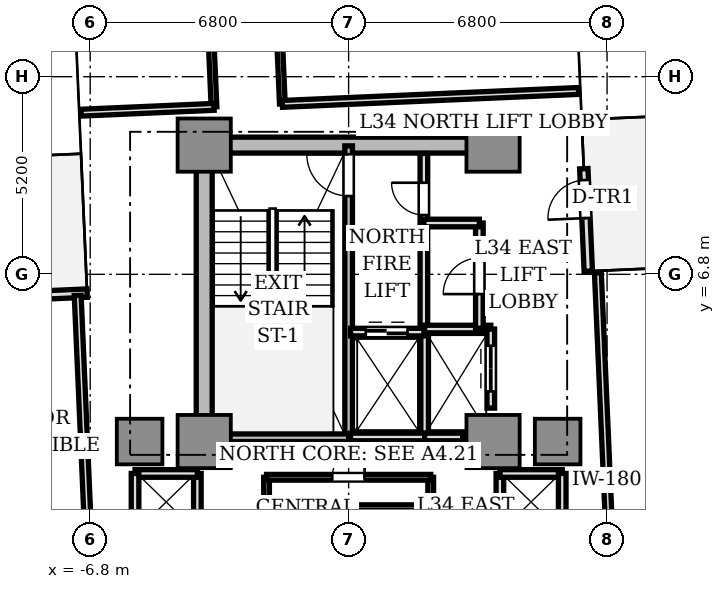
"""IFC4 building model, lengths in metres.
Left out: names, types, materials, properties, quantities, classifications, styles, units other than length and angle.
Written with IfcOpenShell. Run it as: python <this file> out.ifc"""

import sys

from ifc_helpers import new_model, si_unit, direction, frame, frame_2d, origin, origin_2d, place, context, subcontext, project, spatial, rectangle, extrude, source, transform, mapped, element, fill, save


model = new_model("IFC4")
c1 = context("Model", 3, precision=1e-05, world=origin(), true_north=direction((0.0, 1.0)))
c2 = subcontext(c1, "Body", "Model", "MODEL_VIEW")
j1 = project(units=[si_unit("LENGTHUNIT", "METRE"), si_unit("PLANEANGLEUNIT", "RADIAN")], contexts=[c1])
p1 = place(None, origin())
s1 = spatial("IfcSite", under=j1, at=p1, CompositionType="ELEMENT")
p2 = place(p1, origin())
s2 = spatial("IfcBuilding", under=s1, at=p2, CompositionType="ELEMENT")
p3 = place(p2, frame((0.0, 0.0, 124.85)))
s3 = spatial("IfcBuildingStorey", under=s2, at=p3, CompositionType="ELEMENT", Elevation=124.85)
p4 = place(p3, frame((-3.55, 10.2, 0.0), z_axis=(0.0, 0.0, 1.0), x_axis=(1.0, 0.0, 0.0)))
e1 = element("IfcWall", 1, at=p4, inside=s3, PredefinedType="SHEAR", context=c2, shape_type="SweptSolid", body=[
    extrude(rectangle(XDim=7.1, YDim=0.42, at=frame_2d((3.55, 0.0))), origin(), (0.0, 0.0, 1.0), 3.11),
])
p5 = place(p3, frame((-3.8, 2.85, 0.0), z_axis=(0.0, 0.0, 1.0), x_axis=(0.0, 1.0, 0.0)))
e2 = element("IfcWall", 2, at=p5, inside=s3, PredefinedType="SHEAR", context=c2, shape_type="SweptSolid", body=[
    extrude(rectangle(XDim=6.9, YDim=0.42, at=frame_2d((3.45, 0.0))), origin(), (0.0, 0.0, 1.0), 3.11),
])
m1 = source(origin(), c2, "Body", "SweptSolid", [
    extrude(rectangle(XDim=1.4, YDim=1.4, at=origin_2d()), origin(), (0.0, 0.0, 1.0), 3.11),
])
for number, where, z_axis, x_axis in (
    (3, (-3.8, 2.4, 0.0), (0.0, 0.0, 1.0), (1.0, 0.0, 0.0)),
    (4, (3.8, 2.4, 0.0), (0.0, 0.0, 1.0), (1.0, 0.0, 0.0)),
    (5, (-3.8, 10.2, 0.0), (0.0, 0.0, 1.0), (1.0, 0.0, 0.0)),
    (6, (3.8, 10.2, 0.0), (0.0, 0.0, 1.0), (1.0, 0.0, 0.0)),
):
    element("IfcColumn", number, at=place(p3, frame(where, z_axis=z_axis, x_axis=x_axis)), inside=s3, PredefinedType="COLUMN", context=c2, shape_type="MappedRepresentation", body=[
        mapped(m1, transform((0.0, 0.0, 0.0), scale=1.0)),
    ])
m2 = source(origin(), c2, "Body", "SweptSolid", [
    extrude(rectangle(XDim=1.2, YDim=1.2, at=origin_2d()), origin(), (0.0, 0.0, 1.0), 3.11),
])
for number, where, z_axis, x_axis in (
    (7, (5.5, 2.4, 0.0), (0.0, 0.0, 1.0), (1.0, 0.0, 0.0)),
    (8, (-5.5, 2.4, 0.0), (0.0, 0.0, 1.0), (1.0, 0.0, 0.0)),
):
    element("IfcColumn", number, at=place(p3, frame(where, z_axis=z_axis, x_axis=x_axis)), inside=s3, PredefinedType="COLUMN", context=c2, shape_type="MappedRepresentation", body=[
        mapped(m2, transform((0.0, 0.0, 0.0), scale=1.0)),
    ])
p6 = place(p3, frame((6.306, 6.882, 0.0), z_axis=(0.0, 0.0, 1.0), x_axis=(-0.043672655174, 0.999045894436, 0.0)))
e9 = element("IfcWall", 9, at=p6, inside=s3, PredefinedType="STANDARD", context=c2, shape_type="SweptSolid", body=[
    extrude(rectangle(XDim=2.7, YDim=0.22, at=frame_2d((1.35, 0.0))), origin(), (0.0, 0.0, 1.0), 3.11),
])
p7 = place(p6, frame((1.4, 0.0, 0.0)))
e10 = element("IfcOpeningElement", 10, at=p7, cuts=e9, PredefinedType="OPENING", context=c2, shape_type="SweptSolid", body=[
    extrude(rectangle(XDim=1.0, YDim=2.2, at=frame_2d((0.5, 1.1))), frame((0.0, 0.12, 0.0), z_axis=(0.0, -1.0, 0.0), x_axis=(1.0, 0.0, 0.0)), (0.0, 0.0, 1.0), 0.24),
])
p8 = place(p3, frame((-6.882, 6.306, 0.0), z_axis=(0.0, 0.0, 1.0), x_axis=(-0.999045894436, -0.043672655174, 0.0)))
e11 = element("IfcWall", 11, at=p8, inside=s3, PredefinedType="STANDARD", context=c2, shape_type="SweptSolid", body=[
    extrude(rectangle(XDim=2.7, YDim=0.22, at=frame_2d((1.35, 0.0))), origin(), (0.0, 0.0, 1.0), 3.11),
])
p9 = place(p8, frame((1.4, 0.0, 0.0)))
e12 = element("IfcOpeningElement", 12, at=p9, cuts=e11, PredefinedType="OPENING", context=c2, shape_type="SweptSolid", body=[
    extrude(rectangle(XDim=1.0, YDim=2.2, at=frame_2d((0.5, 1.1))), frame((0.0, 0.12, 0.0), z_axis=(0.0, -1.0, 0.0), x_axis=(1.0, 0.0, 0.0)), (0.0, 0.0, 1.0), 0.24),
])
p10 = place(p3, frame((0.0, 2.5, 0.0), z_axis=(0.0, 0.0, 1.0), x_axis=(0.0, 1.0, 0.0)))
e13 = element("IfcWall", 13, at=p10, inside=s3, PredefinedType="SOLIDWALL", context=c2, shape_type="SweptSolid", body=[
    extrude(rectangle(XDim=7.68, YDim=0.2, at=frame_2d((3.84, 0.0))), origin(), (0.0, 0.0, 1.0), 3.11),
])
p11 = place(p10, frame((6.36, 0.0, 0.0)))
e14 = element("IfcOpeningElement", 14, at=p11, cuts=e13, PredefinedType="OPENING", context=c2, shape_type="SweptSolid", body=[
    extrude(rectangle(XDim=1.1, YDim=2.15, at=frame_2d((0.55, 1.075))), frame((0.0, 0.11, 0.0), z_axis=(0.0, -1.0, 0.0), x_axis=(1.0, 0.0, 0.0)), (0.0, 0.0, 1.0), 0.22),
])
p12 = place(p3, frame((-3.72, 2.5, 0.0), z_axis=(0.0, 0.0, 1.0), x_axis=(1.0, 0.0, 0.0)))
e15 = element("IfcWall", 15, at=p12, inside=s3, PredefinedType="SOLIDWALL", context=c2, shape_type="SweptSolid", body=[
    extrude(rectangle(XDim=3.72, YDim=0.2, at=frame_2d((1.86, 0.0))), origin(), (0.0, 0.0, 1.0), 3.11),
])
p13 = place(p3, frame((1.98, 5.32, 0.0), z_axis=(0.0, 0.0, 1.0), x_axis=(0.0, 1.0, 0.0)))
e16 = element("IfcWall", 16, at=p13, inside=s3, PredefinedType="SOLIDWALL", context=c2, shape_type="SweptSolid", body=[
    extrude(rectangle(XDim=4.66, YDim=0.2, at=frame_2d((2.33, 0.0))), origin(), (0.0, 0.0, 1.0), 2.66),
])
p14 = place(p13, frame((3.04, 0.0, 0.0)))
e17 = element("IfcOpeningElement", 17, at=p14, cuts=e16, PredefinedType="OPENING", context=c2, shape_type="SweptSolid", body=[
    extrude(rectangle(XDim=0.85, YDim=2.1, at=frame_2d((0.425, 1.05))), frame((0.0, 0.11, 0.0), z_axis=(0.0, -1.0, 0.0), x_axis=(1.0, 0.0, 0.0)), (0.0, 0.0, 1.0), 0.22),
])
p15 = place(p3, frame((2.0, 2.5, 0.0), z_axis=(0.0, 0.0, 1.0), x_axis=(0.0, 1.0, 0.0)))
e18 = element("IfcWall", 18, at=p15, inside=s3, PredefinedType="SOLIDWALL", context=c2, shape_type="SweptSolid", body=[
    extrude(rectangle(XDim=2.78, YDim=0.2, at=frame_2d((1.39, 0.0))), origin(), (0.0, 0.0, 1.0), 2.66),
])
p16 = place(p3, frame((0.05, 2.52, 0.0), z_axis=(0.0, 0.0, 1.0), x_axis=(1.0, 0.0, 0.0)))
e19 = element("IfcWall", 19, at=p16, inside=s3, PredefinedType="SOLIDWALL", context=c2, shape_type="SweptSolid", body=[
    extrude(rectangle(XDim=1.95, YDim=0.2, at=frame_2d((0.975, 0.0))), origin(), (0.0, 0.0, 1.0), 2.66),
])
p17 = place(p3, frame((0.05, 5.28, 0.0), z_axis=(0.0, 0.0, 1.0), x_axis=(1.0, 0.0, 0.0)))
e20 = element("IfcWall", 20, at=p17, inside=s3, PredefinedType="SOLIDWALL", context=c2, shape_type="SweptSolid", body=[
    extrude(rectangle(XDim=1.93, YDim=0.2, at=frame_2d((0.965, 0.0))), origin(), (0.0, 0.0, 1.0), 2.66),
])
p18 = place(p17, frame((0.4, 0.0, 0.0)))
e21 = element("IfcOpeningElement", 21, at=p18, cuts=e20, PredefinedType="OPENING", context=c2, shape_type="SweptSolid", body=[
    extrude(rectangle(XDim=1.1, YDim=2.2, at=frame_2d((0.55, 1.1))), frame((0.0, 0.11, 0.0), z_axis=(0.0, -1.0, 0.0), x_axis=(1.0, 0.0, 0.0)), (0.0, 0.0, 1.0), 0.22),
])
p19 = place(p3, frame((2.0, 2.52, 0.0), z_axis=(0.0, 0.0, 1.0), x_axis=(1.0, 0.0, 0.0)))
e22 = element("IfcWall", 22, at=p19, inside=s3, PredefinedType="SOLIDWALL", context=c2, shape_type="SweptSolid", body=[
    extrude(rectangle(XDim=1.0, YDim=0.2, at=frame_2d((0.5, 0.0))), origin(), (0.0, 0.0, 1.0), 2.66),
])
p20 = place(p3, frame((2.0, 5.36, 0.0), z_axis=(0.0, 0.0, 1.0), x_axis=(1.0, 0.0, 0.0)))
e23 = element("IfcWall", 23, at=p20, inside=s3, PredefinedType="SOLIDWALL", context=c2, shape_type="SweptSolid", body=[
    extrude(rectangle(XDim=1.74, YDim=0.2, at=frame_2d((0.87, 0.0))), origin(), (0.0, 0.0, 1.0), 2.66),
])
p21 = place(p3, frame((3.74, 3.28, 0.0), z_axis=(0.0, 0.0, 1.0), x_axis=(0.0, 1.0, 0.0)))
e24 = element("IfcWall", 24, at=p21, inside=s3, PredefinedType="SOLIDWALL", context=c2, shape_type="SweptSolid", body=[
    extrude(rectangle(XDim=2.08, YDim=0.2, at=frame_2d((1.04, 0.0))), origin(), (0.0, 0.0, 1.0), 2.66),
])
p22 = place(p21, frame((0.44, 0.0, 0.0)))
e25 = element("IfcOpeningElement", 25, at=p22, cuts=e24, PredefinedType="OPENING", context=c2, shape_type="SweptSolid", body=[
    extrude(rectangle(XDim=1.2, YDim=2.2, at=frame_2d((0.6, 1.1))), frame((0.0, 0.11, 0.0), z_axis=(0.0, -1.0, 0.0), x_axis=(1.0, 0.0, 0.0)), (0.0, 0.0, 1.0), 0.22),
])
p23 = place(p3, frame((3.98, -1.56, 0.0), z_axis=(0.0, 0.0, 1.0), x_axis=(0.0, 1.0, 0.0)))
e26 = element("IfcWall", 26, at=p23, inside=s3, PredefinedType="SOLIDWALL", context=c2, shape_type="SweptSolid", body=[
    extrude(rectangle(XDim=3.12, YDim=0.2, at=frame_2d((1.56, 0.0))), origin(), (0.0, 0.0, 1.0), 2.28),
])
p24 = place(p3, frame((3.98, 1.56, 0.0), z_axis=(0.0, 0.0, 1.0), x_axis=(1.0, 0.0, 0.0)))
e27 = element("IfcWall", 27, at=p24, inside=s3, PredefinedType="SOLIDWALL", context=c2, shape_type="SweptSolid", body=[
    extrude(rectangle(XDim=1.64, YDim=0.2, at=frame_2d((0.82, 0.0))), origin(), (0.0, 0.0, 1.0), 2.66),
])
p25 = place(p3, frame((5.62, 0.0, 0.0), z_axis=(0.0, 0.0, 1.0), x_axis=(0.0, 1.0, 0.0)))
e28 = element("IfcWall", 28, at=p25, inside=s3, PredefinedType="SOLIDWALL", context=c2, shape_type="SweptSolid", body=[
    extrude(rectangle(XDim=1.56, YDim=0.2, at=frame_2d((0.78, 0.0))), origin(), (0.0, 0.0, 1.0), 2.66),
])
p26 = place(p3, frame((-3.98, -1.56, 0.0), z_axis=(0.0, 0.0, 1.0), x_axis=(0.0, 1.0, 0.0)))
e29 = element("IfcWall", 29, at=p26, inside=s3, PredefinedType="SOLIDWALL", context=c2, shape_type="SweptSolid", body=[
    extrude(rectangle(XDim=3.12, YDim=0.2, at=frame_2d((1.56, 0.0))), origin(), (0.0, 0.0, 1.0), 2.28),
])
p27 = place(p3, frame((-5.62, 1.56, 0.0), z_axis=(0.0, 0.0, 1.0), x_axis=(1.0, 0.0, 0.0)))
e30 = element("IfcWall", 30, at=p27, inside=s3, PredefinedType="SOLIDWALL", context=c2, shape_type="SweptSolid", body=[
    extrude(rectangle(XDim=1.64, YDim=0.2, at=frame_2d((0.82, 0.0))), origin(), (0.0, 0.0, 1.0), 2.66),
])
p28 = place(p3, frame((-5.62, 0.0, 0.0), z_axis=(0.0, 0.0, 1.0), x_axis=(0.0, 1.0, 0.0)))
e31 = element("IfcWall", 31, at=p28, inside=s3, PredefinedType="SOLIDWALL", context=c2, shape_type="SweptSolid", body=[
    extrude(rectangle(XDim=1.56, YDim=0.2, at=frame_2d((0.78, 0.0))), origin(), (0.0, 0.0, 1.0), 2.66),
])
p29 = place(p3, frame((3.44, 5.38, 0.0), z_axis=(0.0, 0.0, 1.0), x_axis=(0.0, 1.0, 0.0)))
e32 = element("IfcWall", 32, at=p29, inside=s3, PredefinedType="SOLIDWALL", context=c2, shape_type="SweptSolid", body=[
    extrude(rectangle(XDim=2.77, YDim=0.2, at=frame_2d((1.385, 0.0))), origin(), (0.0, 0.0, 1.0), 2.66),
])
p30 = place(p29, frame((0.9, 0.0, 0.0)))
e33 = element("IfcOpeningElement", 33, at=p30, cuts=e32, PredefinedType="OPENING", context=c2, shape_type="SweptSolid", body=[
    extrude(rectangle(XDim=0.95, YDim=2.15, at=frame_2d((0.475, 1.075))), frame((0.0, 0.11, 0.0), z_axis=(0.0, -1.0, 0.0), x_axis=(1.0, 0.0, 0.0)), (0.0, 0.0, 1.0), 0.22),
])
p31 = place(p3, frame((1.98, 8.15, 0.0), z_axis=(0.0, 0.0, 1.0), x_axis=(1.0, 0.0, 0.0)))
e34 = element("IfcWall", 34, at=p31, inside=s3, PredefinedType="SOLIDWALL", context=c2, shape_type="SweptSolid", body=[
    extrude(rectangle(XDim=1.46, YDim=0.2, at=frame_2d((0.73, 0.0))), origin(), (0.0, 0.0, 1.0), 2.66),
])
p32 = place(p3, frame((2.16, -1.46, 0.0), z_axis=(0.0, 0.0, 1.0), x_axis=(0.0, 1.0, 0.0)))
e35 = element("IfcWall", 35, at=p32, inside=s3, PredefinedType="PARTITIONING", context=c2, shape_type="SweptSolid", body=[
    extrude(rectangle(XDim=2.92, YDim=0.15, at=frame_2d((1.46, 0.0))), origin(), (0.0, 0.0, 1.0), 2.66),
])
p33 = place(p32, frame((1.035, 0.0, 0.0)))
e36 = element("IfcOpeningElement", 36, at=p33, cuts=e35, PredefinedType="OPENING", context=c2, shape_type="SweptSolid", body=[
    extrude(rectangle(XDim=0.85, YDim=2.1, at=frame_2d((0.425, 1.05))), frame((0.0, 0.085, 0.0), z_axis=(0.0, -1.0, 0.0), x_axis=(1.0, 0.0, 0.0)), (0.0, 0.0, 1.0), 0.17),
])
p34 = place(p3, frame((-2.16, -1.46, 0.0), z_axis=(0.0, 0.0, 1.0), x_axis=(0.0, 1.0, 0.0)))
e37 = element("IfcWall", 37, at=p34, inside=s3, PredefinedType="PARTITIONING", context=c2, shape_type="SweptSolid", body=[
    extrude(rectangle(XDim=2.92, YDim=0.15, at=frame_2d((1.46, 0.0))), origin(), (0.0, 0.0, 1.0), 2.66),
])
p35 = place(p3, frame((-2.16, 1.46, 0.0), z_axis=(0.0, 0.0, 1.0), x_axis=(1.0, 0.0, 0.0)))
e38 = element("IfcWall", 38, at=p35, inside=s3, PredefinedType="PARTITIONING", context=c2, shape_type="SweptSolid", body=[
    extrude(rectangle(XDim=4.32, YDim=0.15, at=frame_2d((2.16, 0.0))), origin(), (0.0, 0.0, 1.0), 2.66),
])
p36 = place(p35, frame((1.73, 0.0, 0.0)))
e39 = element("IfcOpeningElement", 39, at=p36, cuts=e38, PredefinedType="OPENING", context=c2, shape_type="SweptSolid", body=[
    extrude(rectangle(XDim=0.85, YDim=2.1, at=frame_2d((0.425, 1.05))), frame((0.0, 0.085, 0.0), z_axis=(0.0, -1.0, 0.0), x_axis=(1.0, 0.0, 0.0)), (0.0, 0.0, 1.0), 0.17),
])
p37 = place(p3, frame((-2.16, 0.66, 0.0), z_axis=(0.0, 0.0, 1.0), x_axis=(1.0, 0.0, 0.0)))
e40 = element("IfcWall", 40, at=p37, inside=s3, PredefinedType="PARTITIONING", context=c2, shape_type="SweptSolid", body=[
    extrude(rectangle(XDim=4.32, YDim=0.15, at=frame_2d((2.16, 0.0))), origin(), (0.0, 0.0, 1.0), 2.66),
])
p38 = place(p3, frame((7.033, -4.047, 0.0), z_axis=(0.0, 0.0, 1.0), x_axis=(-0.043609267053, 0.999048663393, 0.0)))
e41 = element("IfcWall", 41, at=p38, inside=s3, PredefinedType="PARTITIONING", context=c2, shape_type="SweptSolid", body=[
    extrude(rectangle(XDim=10.9, YDim=0.18, at=frame_2d((5.45, 0.0))), origin(), (0.0, 0.0, 1.0), 2.66),
])
p39 = place(p3, frame((-3.542, 11.206, 0.0), z_axis=(0.0, 0.0, 1.0), x_axis=(-0.043604692074, 0.999048863084, 0.0)))
e42 = element("IfcWall", 42, at=p39, inside=s3, PredefinedType="PARTITIONING", context=c2, shape_type="SweptSolid", body=[
    extrude(rectangle(XDim=9.3, YDim=0.15, at=frame_2d((4.65, 0.0))), origin(), (0.0, 0.0, 1.0), 2.66),
])
p40 = place(p39, frame((1.85, 0.0, 0.0)))
e43 = element("IfcOpeningElement", 43, at=p40, cuts=e42, PredefinedType="OPENING", context=c2, shape_type="SweptSolid", body=[
    extrude(rectangle(XDim=0.85, YDim=2.1, at=frame_2d((0.425, 1.05))), frame((0.0, 0.085, 0.0), z_axis=(0.0, -1.0, 0.0), x_axis=(1.0, 0.0, 0.0)), (0.0, 0.0, 1.0), 0.17),
])
p41 = place(p39, frame((6.5, 0.0, 0.0)))
e44 = element("IfcOpeningElement", 44, at=p41, cuts=e42, PredefinedType="OPENING", context=c2, shape_type="SweptSolid", body=[
    extrude(rectangle(XDim=0.85, YDim=2.1, at=frame_2d((0.425, 1.05))), frame((0.0, 0.085, 0.0), z_axis=(0.0, -1.0, 0.0), x_axis=(1.0, 0.0, 0.0)), (0.0, 0.0, 1.0), 0.17),
])
p42 = place(p3, frame((-1.744, 11.285, 0.0), z_axis=(0.0, 0.0, 1.0), x_axis=(-0.043630894187, 0.999047719117, 0.0)))
e45 = element("IfcWall", 45, at=p42, inside=s3, PredefinedType="PARTITIONING", context=c2, shape_type="SweptSolid", body=[
    extrude(rectangle(XDim=9.3, YDim=0.15, at=frame_2d((4.65, 0.0))), origin(), (0.0, 0.0, 1.0), 2.66),
])
p43 = place(p42, frame((2.95, 0.0, 0.0)))
e46 = element("IfcOpeningElement", 46, at=p43, cuts=e45, PredefinedType="OPENING", context=c2, shape_type="SweptSolid", body=[
    extrude(rectangle(XDim=0.85, YDim=2.1, at=frame_2d((0.425, 1.05))), frame((0.0, 0.085, 0.0), z_axis=(0.0, -1.0, 0.0), x_axis=(1.0, 0.0, 0.0)), (0.0, 0.0, 1.0), 0.17),
])
p44 = place(p3, frame((-3.542, 11.206, 0.0), z_axis=(0.0, 0.0, 1.0), x_axis=(-0.999046129111, -0.04366728647, 0.0)))
e47 = element("IfcWall", 47, at=p44, inside=s3, PredefinedType="PARTITIONING", context=c2, shape_type="SweptSolid", body=[
    extrude(rectangle(XDim=3.5, YDim=0.18, at=frame_2d((1.75, 0.0))), origin(), (0.0, 0.0, 1.0), 2.66),
])
p45 = place(p3, frame((6.049, 11.625, 0.0), z_axis=(0.0, 0.0, 1.0), x_axis=(-0.999047634936, -0.043632821702, 0.0)))
e48 = element("IfcWall", 48, at=p45, inside=s3, PredefinedType="PARTITIONING", context=c2, shape_type="SweptSolid", body=[
    extrude(rectangle(XDim=7.8, YDim=0.18, at=frame_2d((3.9, 0.0))), origin(), (0.0, 0.0, 1.0), 2.66),
])
p46 = place(p3, frame((-7.129, 6.245, 0.0), z_axis=(0.0, 0.0, 1.0), x_axis=(0.043600217373, -0.999049058378, 0.0)))
e49 = element("IfcWall", 49, at=p46, inside=s3, PredefinedType="PARTITIONING", context=c2, shape_type="SweptSolid", body=[
    extrude(rectangle(XDim=7.8, YDim=0.18, at=frame_2d((3.9, 0.0))), origin(), (0.0, 0.0, 1.0), 2.66),
])
m3 = source(origin(), c2, "Body", "SweptSolid", [
    extrude(rectangle(XDim=1.0, YDim=0.05, at=origin_2d()), origin(), (0.0, 0.0, 1.0), 2.2),
])
p47 = place(p7, frame((0.5, 0.0, 0.0)))
e50 = element("IfcDoor", 50, at=p47, inside=s3, OperationType="SINGLE_SWING_LEFT", PredefinedType="DOOR", context=c2, shape_type="MappedRepresentation", body=[
    mapped(m3, transform((0.0, 0.0, 0.0), scale=1.0)),
])
fill(e10, e50)
m4 = source(origin(), c2, "Body", "SweptSolid", [
    extrude(rectangle(XDim=1.1, YDim=0.05, at=origin_2d()), origin(), (0.0, 0.0, 1.0), 2.15),
])
p48 = place(p11, frame((0.55, 0.0, 0.0)))
e51 = element("IfcDoor", 51, at=p48, inside=s3, OperationType="SINGLE_SWING_RIGHT", PredefinedType="DOOR", context=c2, shape_type="MappedRepresentation", body=[
    mapped(m4, transform((0.0, 0.0, 0.0), scale=1.0)),
])
fill(e14, e51)
m5 = source(origin(), c2, "Body", "SweptSolid", [
    extrude(rectangle(XDim=0.85, YDim=0.05, at=origin_2d()), origin(), (0.0, 0.0, 1.0), 2.1),
])
p49 = place(p14, frame((0.425, 0.0, 0.0)))
e52 = element("IfcDoor", 52, at=p49, inside=s3, OperationType="SINGLE_SWING_RIGHT", PredefinedType="DOOR", context=c2, shape_type="MappedRepresentation", body=[
    mapped(m5, transform((0.0, 0.0, 0.0), scale=1.0)),
])
fill(e17, e52)
m6 = source(origin(), c2, "Body", "SweptSolid", [
    extrude(rectangle(XDim=1.1, YDim=0.05, at=origin_2d()), origin(), (0.0, 0.0, 1.0), 2.2),
])
p50 = place(p18, frame((0.55, 0.0, 0.0)))
e53 = element("IfcDoor", 53, at=p50, inside=s3, OperationType="DOUBLE_DOOR_SLIDING", PredefinedType="DOOR", context=c2, shape_type="MappedRepresentation", body=[
    mapped(m6, transform((0.0, 0.0, 0.0), scale=1.0)),
])
fill(e21, e53)
m7 = source(origin(), c2, "Body", "SweptSolid", [
    extrude(rectangle(XDim=1.2, YDim=0.05, at=origin_2d()), origin(), (0.0, 0.0, 1.0), 2.2),
])
p51 = place(p22, frame((0.6, 0.0, 0.0)))
e54 = element("IfcDoor", 54, at=p51, inside=s3, OperationType="DOUBLE_DOOR_SLIDING", PredefinedType="DOOR", context=c2, shape_type="MappedRepresentation", body=[
    mapped(m7, transform((0.0, 0.0, 0.0), scale=1.0)),
])
fill(e25, e54)
m8 = source(origin(), c2, "Body", "SweptSolid", [
    extrude(rectangle(XDim=0.95, YDim=0.05, at=origin_2d()), origin(), (0.0, 0.0, 1.0), 2.15),
])
p52 = place(p30, frame((0.475, 0.0, 0.0)))
e55 = element("IfcDoor", 55, at=p52, inside=s3, OperationType="SINGLE_SWING_LEFT", PredefinedType="DOOR", context=c2, shape_type="MappedRepresentation", body=[
    mapped(m8, transform((0.0, 0.0, 0.0), scale=1.0)),
])
fill(e33, e55)
p53 = place(p36, frame((0.425, 0.0, 0.0)))
e56 = element("IfcDoor", 56, at=p53, inside=s3, OperationType="SINGLE_SWING_RIGHT", PredefinedType="DOOR", context=c2, shape_type="MappedRepresentation", body=[
    mapped(m5, transform((0.0, 0.0, 0.0), scale=1.0)),
])
fill(e39, e56)
save(model, sys.argv[1])
